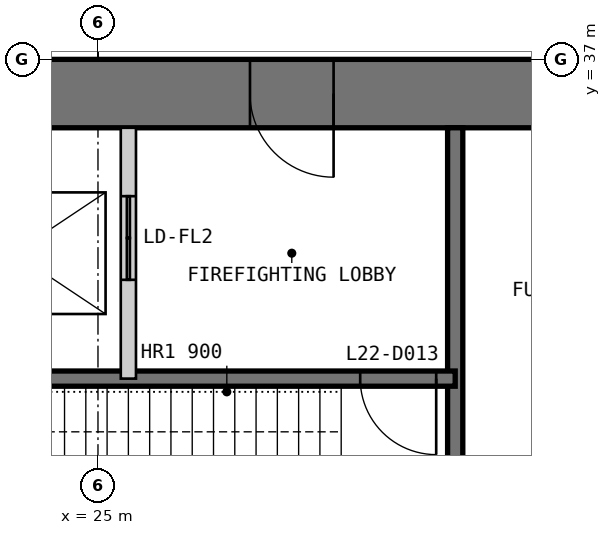
"""IFC4 building model, lengths in metres.
Left out: names, types, materials, properties, quantities, classifications, styles, units other than length and angle.
Written with IfcOpenShell. Run it as: python <this file> out.ifc"""

import sys

from ifc_helpers import new_model, si_unit, direction, frame, frame_2d, origin, place, context, subcontext, project, spatial, polyline, rectangle, outline, extrude, element, fill, save


model = new_model("IFC4")
c1 = context("Model", 3, precision=1e-05, world=origin(), true_north=direction((0.0, 1.0)))
c2 = subcontext(c1, "Body", "Model", "MODEL_VIEW")
j1 = project(units=[si_unit("LENGTHUNIT", "METRE"), si_unit("PLANEANGLEUNIT", "RADIAN")], contexts=[c1])
p1 = place(None, origin())
s1 = spatial("IfcSite", under=j1, at=p1, CompositionType="ELEMENT")
p2 = place(p1, origin())
s2 = spatial("IfcBuilding", under=s1, at=p2, CompositionType="ELEMENT")
p3 = place(p2, frame((0.0, 0.0, 97.0)))
s3 = spatial("IfcBuildingStorey", under=s2, at=p3, CompositionType="ELEMENT", Elevation=97.0)
p4 = place(p3, frame((37.0, 36.55, 0.0), z_axis=(0.0, 0.0, 1.0), x_axis=(-1.0, 0.0, 0.0)))
e1 = element("IfcWall", 1, at=p4, inside=s3, PredefinedType="SHEAR", context=c2, shape_type="SweptSolid", body=[
    extrude(outline(polyline([(0.0, -0.45), (24.0, -0.45), (23.1, 0.45), (0.9, 0.45), (0.0, -0.45)])), origin(), (0.0, 0.0, 1.0), 5.4),
])
p5 = place(p4, frame((4.9, 0.0, 0.0)))
e2 = element("IfcOpeningElement", 2, at=p5, cuts=e1, PredefinedType="OPENING", context=c2, shape_type="SweptSolid", body=[
    extrude(rectangle(XDim=1.0, YDim=2.2, at=frame_2d((0.5, 1.1))), frame((0.0, 0.46, 0.0), z_axis=(0.0, -1.0, 0.0), x_axis=(1.0, 0.0, 0.0)), (0.0, 0.0, 1.0), 0.92),
])
p6 = place(p4, frame((8.9, 0.0, 0.0)))
e3 = element("IfcOpeningElement", 3, at=p6, cuts=e1, PredefinedType="OPENING", context=c2, shape_type="SweptSolid", body=[
    extrude(rectangle(XDim=1.1, YDim=2.2, at=frame_2d((0.55, 1.1))), frame((0.0, 0.46, 0.0), z_axis=(0.0, -1.0, 0.0), x_axis=(1.0, 0.0, 0.0)), (0.0, 0.0, 1.0), 0.92),
])
p7 = place(p4, frame((15.05, 0.0, 0.0)))
e4 = element("IfcOpeningElement", 4, at=p7, cuts=e1, PredefinedType="OPENING", context=c2, shape_type="SweptSolid", body=[
    extrude(rectangle(XDim=0.9, YDim=2.2, at=frame_2d((0.45, 1.1))), frame((0.0, 0.46, 0.0), z_axis=(0.0, -1.0, 0.0), x_axis=(1.0, 0.0, 0.0)), (0.0, 0.0, 1.0), 0.92),
])
p8 = place(p4, frame((17.9, 0.0, 0.0)))
e5 = element("IfcOpeningElement", 5, at=p8, cuts=e1, PredefinedType="OPENING", context=c2, shape_type="SweptSolid", body=[
    extrude(rectangle(XDim=1.0, YDim=2.2, at=frame_2d((0.5, 1.1))), frame((0.0, 0.46, 0.0), z_axis=(0.0, -1.0, 0.0), x_axis=(1.0, 0.0, 0.0)), (0.0, 0.0, 1.0), 0.92),
])
p9 = place(p4, frame((21.4, 0.0, 0.0)))
e6 = element("IfcOpeningElement", 6, at=p9, cuts=e1, PredefinedType="OPENING", context=c2, shape_type="SweptSolid", body=[
    extrude(rectangle(XDim=1.0, YDim=2.2, at=frame_2d((0.5, 1.1))), frame((0.0, 0.46, 0.0), z_axis=(0.0, -1.0, 0.0), x_axis=(1.0, 0.0, 0.0)), (0.0, 0.0, 1.0), 0.92),
])
p10 = place(p3, frame((29.7, 36.1, 0.0), z_axis=(0.0, 0.0, 1.0), x_axis=(0.0, -1.0, 0.0)))
e7 = element("IfcWall", 7, at=p10, inside=s3, PredefinedType="SOLIDWALL", context=c2, shape_type="SweptSolid", body=[
    extrude(rectangle(XDim=16.1, YDim=0.2, at=frame_2d((8.05, 0.0))), origin(), (0.0, 0.0, 1.0), 5.2),
])
p11 = place(p3, frame((29.7, 32.8, 0.0), z_axis=(0.0, 0.0, 1.0), x_axis=(-1.0, 0.0, 0.0)))
e8 = element("IfcWall", 8, at=p11, inside=s3, PredefinedType="SOLIDWALL", context=c2, shape_type="SweptSolid", body=[
    extrude(rectangle(XDim=9.4, YDim=0.2, at=frame_2d((4.7, 0.0))), origin(), (0.0, 0.0, 1.0), 5.2),
])
p12 = place(p11, frame((0.25, 0.0, 0.0)))
e9 = element("IfcOpeningElement", 9, at=p12, cuts=e8, PredefinedType="OPENING", context=c2, shape_type="SweptSolid", body=[
    extrude(rectangle(XDim=1.0, YDim=2.2, at=frame_2d((0.5, 1.1))), frame((0.0, 0.11, 0.0), z_axis=(0.0, -1.0, 0.0), x_axis=(1.0, 0.0, 0.0)), (0.0, 0.0, 1.0), 0.22),
])
p13 = place(p3, frame((25.4, 36.1, 0.0), z_axis=(0.0, 0.0, 1.0), x_axis=(0.0, -1.0, 0.0)))
e10 = element("IfcWall", 10, at=p13, inside=s3, PredefinedType="PARTITIONING", context=c2, shape_type="SweptSolid", body=[
    extrude(rectangle(XDim=3.3, YDim=0.2, at=frame_2d((1.65, 0.0))), origin(), (0.0, 0.0, 1.0), 5.2),
])
p14 = place(p13, frame((0.9, 0.0, 0.0)))
e11 = element("IfcOpeningElement", 11, at=p14, cuts=e10, PredefinedType="OPENING", context=c2, shape_type="SweptSolid", body=[
    extrude(rectangle(XDim=1.1, YDim=2.2, at=frame_2d((0.55, 1.1))), frame((0.0, 0.11, 0.0), z_axis=(0.0, -1.0, 0.0), x_axis=(1.0, 0.0, 0.0)), (0.0, 0.0, 1.0), 0.22),
])
p15 = place(p6, origin())
e12 = element("IfcDoor", 12, at=p15, inside=s3, OperationType="SINGLE_SWING_LEFT", PredefinedType="DOOR", context=c2, shape_type="SweptSolid", body=[
    extrude(rectangle(XDim=1.1, YDim=2.2, at=frame_2d((0.55, 1.1))), frame((0.0, 0.025, 0.0), z_axis=(0.0, -1.0, 0.0), x_axis=(1.0, 0.0, 0.0)), (0.0, 0.0, 1.0), 0.05),
    extrude(outline(polyline([(0.0, 0.0), (0.04, 0.0), (0.04, 2.16), (1.06, 2.16), (1.06, 0.0), (1.1, 0.0), (1.1, 2.2), (0.0, 2.2), (0.0, 0.0)])), frame((0.0, 0.3, 0.0), z_axis=(0.0, -1.0, 0.0), x_axis=(1.0, 0.0, 0.0)), (0.0, 0.0, 1.0), 0.6),
])
fill(e3, e12)
p16 = place(p12, origin())
e13 = element("IfcDoor", 13, at=p16, inside=s3, OperationType="SINGLE_SWING_LEFT", PredefinedType="DOOR", context=c2, shape_type="SweptSolid", body=[
    extrude(rectangle(XDim=1.0, YDim=2.2, at=frame_2d((0.5, 1.1))), frame((0.0, 0.025, 0.0), z_axis=(0.0, -1.0, 0.0), x_axis=(1.0, 0.0, 0.0)), (0.0, 0.0, 1.0), 0.05),
])
fill(e9, e13)
p17 = place(p14, origin())
e14 = element("IfcDoor", 14, at=p17, inside=s3, OperationType="DOUBLE_DOOR_SLIDING", PredefinedType="DOOR", context=c2, shape_type="SweptSolid", body=[
    extrude(rectangle(XDim=1.1, YDim=2.2, at=frame_2d((0.55, 1.1))), frame((0.0, 0.025, 0.0), z_axis=(0.0, -1.0, 0.0), x_axis=(1.0, 0.0, 0.0)), (0.0, 0.0, 1.0), 0.05),
])
fill(e11, e14)
save(model, sys.argv[1])
